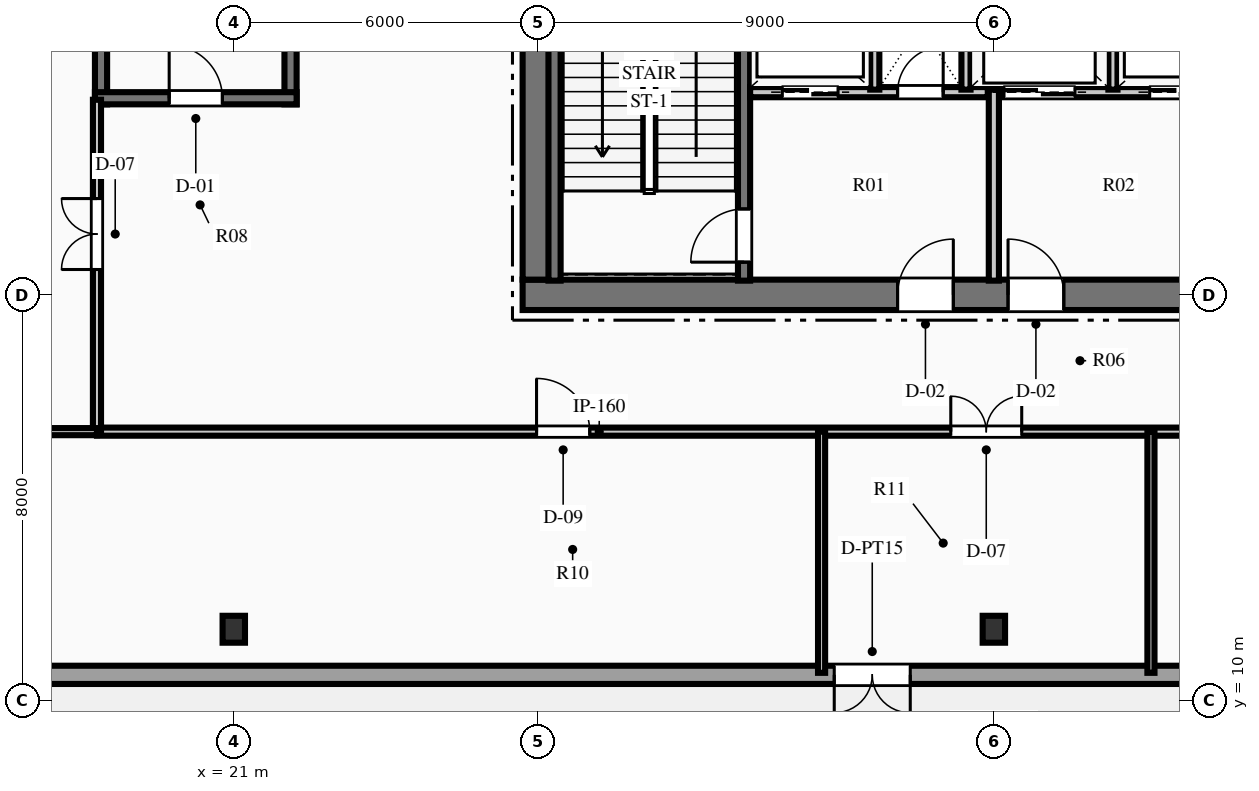
"""IFC4 building model, lengths in metres.
Left out: names, types, materials, properties, quantities, classifications, styles, units other than length and angle.
Written with IfcOpenShell. Run it as: python <this file> out.ifc"""

import sys

from ifc_helpers import new_model, si_unit, direction, frame, frame_2d, origin, origin_2d, place, context, subcontext, project, spatial, rectangle, i_section, extrude, element, fill, save


model = new_model("IFC4")
c1 = context("Model", 3, precision=1e-05, world=origin(), true_north=direction((0.0, 1.0)))
c2 = subcontext(c1, "Body", "Model", "MODEL_VIEW")
j1 = project(units=[si_unit("LENGTHUNIT", "METRE"), si_unit("PLANEANGLEUNIT", "RADIAN")], contexts=[c1])
p1 = place(None, origin())
s1 = spatial("IfcSite", under=j1, at=p1, CompositionType="ELEMENT")
p2 = place(p1, origin())
s2 = spatial("IfcBuilding", under=s1, at=p2, CompositionType="ELEMENT")
p3 = place(p2, frame((0.0, 0.0, 22.2)))
s3 = spatial("IfcBuildingStorey", under=s2, at=p3, CompositionType="ELEMENT", Elevation=22.2)
p4 = place(p3, frame((26.7, 18.0, 0.0), z_axis=(0.0, 0.0, 1.0), x_axis=(1.0, 0.0, 0.0)))
e1 = element("IfcWall", 1, at=p4, inside=s3, PredefinedType="SHEAR", context=c2, shape_type="SweptSolid", body=[
    extrude(rectangle(XDim=18.6, YDim=0.6, at=frame_2d((9.3, 0.0))), origin(), (0.0, 0.0, 1.0), 6.0),
])
p5 = place(p4, frame((7.4, 0.0, 0.0)))
e2 = element("IfcOpeningElement", 2, at=p5, cuts=e1, PredefinedType="OPENING", context=c2, shape_type="SweptSolid", body=[
    extrude(rectangle(XDim=1.1, YDim=2.15, at=frame_2d((0.55, 1.075))), frame((0.0, 0.31, 0.0), z_axis=(0.0, -1.0, 0.0), x_axis=(1.0, 0.0, 0.0)), (0.0, 0.0, 1.0), 0.62),
])
p6 = place(p4, frame((9.58, 0.0, 0.0)))
e3 = element("IfcOpeningElement", 3, at=p6, cuts=e1, PredefinedType="OPENING", context=c2, shape_type="SweptSolid", body=[
    extrude(rectangle(XDim=1.1, YDim=2.15, at=frame_2d((0.55, 1.075))), frame((0.0, 0.31, 0.0), z_axis=(0.0, -1.0, 0.0), x_axis=(1.0, 0.0, 0.0)), (0.0, 0.0, 1.0), 0.62),
])
p7 = place(p3, frame((27.0, 18.3, 0.0), z_axis=(0.0, 0.0, 1.0), x_axis=(0.0, 1.0, 0.0)))
e4 = element("IfcWall", 4, at=p7, inside=s3, PredefinedType="SHEAR", context=c2, shape_type="SweptSolid", body=[
    extrude(rectangle(XDim=15.4, YDim=0.6, at=frame_2d((7.7, 0.0))), origin(), (0.0, 0.0, 1.0), 6.0),
])
p8 = place(p7, frame((9.94, 0.0, 0.0)))
e5 = element("IfcOpeningElement", 5, at=p8, cuts=e4, PredefinedType="OPENING", context=c2, shape_type="SweptSolid", body=[
    extrude(rectangle(XDim=1.4, YDim=2.2, at=frame_2d((0.7, 1.1))), frame((0.0, 0.31, 0.0), z_axis=(0.0, -1.0, 0.0), x_axis=(1.0, 0.0, 0.0)), (0.0, 0.0, 1.0), 0.62),
])
p9 = place(p3, frame((31.07, 18.28, 0.0), z_axis=(0.0, 0.0, 1.0), x_axis=(0.0, 1.0, 0.0)))
e6 = element("IfcWall", 6, at=p9, inside=s3, PredefinedType="SHEAR", context=c2, shape_type="SweptSolid", body=[
    extrude(rectangle(XDim=8.26, YDim=0.24, at=frame_2d((4.13, 0.0))), origin(), (0.0, 0.0, 1.0), 6.0),
])
p10 = place(p9, frame((0.365, 0.0, 0.0)))
e7 = element("IfcOpeningElement", 7, at=p10, cuts=e6, PredefinedType="OPENING", context=c2, shape_type="SweptSolid", body=[
    extrude(rectangle(XDim=1.05, YDim=2.15, at=frame_2d((0.525, 1.075))), frame((0.0, 0.13, 0.0), z_axis=(0.0, -1.0, 0.0), x_axis=(1.0, 0.0, 0.0)), (0.0, 0.0, 1.0), 0.26),
])
p11 = place(p3, frame((27.33, 18.28, 0.0), z_axis=(0.0, 0.0, 1.0), x_axis=(0.0, 1.0, 0.0)))
e8 = element("IfcWall", 8, at=p11, inside=s3, PredefinedType="SHEAR", context=c2, shape_type="SweptSolid", body=[
    extrude(rectangle(XDim=8.26, YDim=0.24, at=frame_2d((4.13, 0.0))), origin(), (0.0, 0.0, 1.0), 6.0),
])
for number, where, z_axis, x_axis in (
    (9, (18.38, 21.76, 0.0), (0.0, 0.0, 1.0), (0.0, 1.0, 0.0)),
    (10, (22.12, 21.76, 0.0), (0.0, 0.0, 1.0), (0.0, 1.0, 0.0)),
):
    element("IfcWall", number, at=place(p3, frame(where, z_axis=z_axis, x_axis=x_axis)), inside=s3, PredefinedType="SHEAR", context=c2, shape_type="SweptSolid", body=[
        extrude(rectangle(XDim=8.38, YDim=0.24, at=frame_2d((4.19, 0.0))), origin(), (0.0, 0.0, 1.0), 6.0),
    ])
p12 = place(p3, frame((18.26, 21.88, 0.0), z_axis=(0.0, 0.0, 1.0), x_axis=(1.0, 0.0, 0.0)))
e11 = element("IfcWall", 11, at=p12, inside=s3, PredefinedType="SHEAR", context=c2, shape_type="SweptSolid", body=[
    extrude(rectangle(XDim=3.98, YDim=0.24, at=frame_2d((1.99, 0.0))), origin(), (0.0, 0.0, 1.0), 6.0),
])
p13 = place(p12, frame((1.465, 0.0, 0.0)))
e12 = element("IfcOpeningElement", 12, at=p13, cuts=e11, PredefinedType="OPENING", context=c2, shape_type="SweptSolid", body=[
    extrude(rectangle(XDim=1.05, YDim=2.15, at=frame_2d((0.525, 1.075))), frame((0.0, 0.13, 0.0), z_axis=(0.0, -1.0, 0.0), x_axis=(1.0, 0.0, 0.0)), (0.0, 0.0, 1.0), 0.26),
])
for number, where, z_axis, x_axis in (
    (13, (21.0, 11.4, 0.0), (0.0, 0.0, 1.0), (1.0, 0.0, 0.0)),
    (14, (36.0, 11.4, 0.0), (0.0, 0.0, 1.0), (1.0, 0.0, 0.0)),
):
    element("IfcColumn", number, at=place(p3, frame(where, z_axis=z_axis, x_axis=x_axis)), inside=s3, PredefinedType="COLUMN", context=c2, shape_type="SweptSolid", body=[
        extrude(i_section(OverallWidth=0.442, OverallDepth=0.531, WebThickness=0.066, FlangeThickness=0.106, at=origin_2d()), origin(), (0.0, 0.0, 1.0), 6.0),
    ])
p14 = place(p3, frame((59.8, 10.5, 0.0), z_axis=(0.0, 0.0, 1.0), x_axis=(-1.0, 0.0, 0.0)))
e15 = element("IfcWall", 15, at=p14, inside=s3, PredefinedType="STANDARD", context=c2, shape_type="SweptSolid", body=[
    extrude(rectangle(XDim=47.6, YDim=0.36, at=frame_2d((23.8, 0.0))), origin(), (0.0, 0.0, 1.0), 5.59),
])
p15 = place(p14, frame((25.45, 0.0, 0.0)))
e16 = element("IfcOpeningElement", 16, at=p15, cuts=e15, PredefinedType="OPENING", context=c2, shape_type="SweptSolid", body=[
    extrude(rectangle(XDim=1.5, YDim=2.25, at=frame_2d((0.75, 1.125))), frame((0.0, 0.19, 0.0), z_axis=(0.0, -1.0, 0.0), x_axis=(1.0, 0.0, 0.0)), (0.0, 0.0, 1.0), 0.38),
])
p16 = place(p3, frame((36.0, 18.28, 0.0), z_axis=(0.0, 0.0, 1.0), x_axis=(0.0, 1.0, 0.0)))
e17 = element("IfcWall", 17, at=p16, inside=s3, PredefinedType="PARTITIONING", context=c2, shape_type="SweptSolid", body=[
    extrude(rectangle(XDim=3.77, YDim=0.2, at=frame_2d((1.885, 0.0))), origin(), (0.0, 0.0, 1.0), 5.59),
])
p17 = place(p3, frame((31.19, 22.0, 0.0), z_axis=(0.0, 0.0, 1.0), x_axis=(1.0, 0.0, 0.0)))
e18 = element("IfcWall", 18, at=p17, inside=s3, PredefinedType="PARTITIONING", context=c2, shape_type="SweptSolid", body=[
    extrude(rectangle(XDim=4.69, YDim=0.2, at=frame_2d((2.345, 0.0))), origin(), (0.0, 0.0, 1.0), 5.59),
])
p18 = place(p17, frame((2.91, 0.0, 0.0)))
e19 = element("IfcOpeningElement", 19, at=p18, cuts=e18, PredefinedType="OPENING", context=c2, shape_type="SweptSolid", body=[
    extrude(rectangle(XDim=0.9, YDim=2.15, at=frame_2d((0.45, 1.075))), frame((0.0, 0.11, 0.0), z_axis=(0.0, -1.0, 0.0), x_axis=(1.0, 0.0, 0.0)), (0.0, 0.0, 1.0), 0.22),
])
p19 = place(p17, frame((0.635, 0.0, 0.0)))
e20 = element("IfcOpeningElement", 20, at=p19, cuts=e18, PredefinedType="OPENING", context=c2, shape_type="SweptSolid", body=[
    extrude(rectangle(XDim=1.1, YDim=2.15, at=frame_2d((0.55, 1.075))), frame((0.0, 0.11, 0.0), z_axis=(0.0, -1.0, 0.0), x_axis=(1.0, 0.0, 0.0)), (0.0, 0.0, 1.0), 0.22),
])
p20 = place(p3, frame((36.12, 22.0, 0.0), z_axis=(0.0, 0.0, 1.0), x_axis=(1.0, 0.0, 0.0)))
e21 = element("IfcWall", 21, at=p20, inside=s3, PredefinedType="PARTITIONING", context=c2, shape_type="SweptSolid", body=[
    extrude(rectangle(XDim=4.69, YDim=0.2, at=frame_2d((2.345, 0.0))), origin(), (0.0, 0.0, 1.0), 5.59),
])
p21 = place(p20, frame((2.955, 0.0, 0.0)))
e22 = element("IfcOpeningElement", 22, at=p21, cuts=e21, PredefinedType="OPENING", context=c2, shape_type="SweptSolid", body=[
    extrude(rectangle(XDim=1.1, YDim=2.15, at=frame_2d((0.55, 1.075))), frame((0.0, 0.11, 0.0), z_axis=(0.0, -1.0, 0.0), x_axis=(1.0, 0.0, 0.0)), (0.0, 0.0, 1.0), 0.22),
])
p22 = place(p20, frame((0.08, 0.0, 0.0)))
e23 = element("IfcOpeningElement", 23, at=p22, cuts=e21, PredefinedType="OPENING", context=c2, shape_type="SweptSolid", body=[
    extrude(rectangle(XDim=1.4, YDim=2.2, at=frame_2d((0.7, 1.1))), frame((0.0, 0.11, 0.0), z_axis=(0.0, -1.0, 0.0), x_axis=(1.0, 0.0, 0.0)), (0.0, 0.0, 1.0), 0.22),
])
for number, where, z_axis, x_axis in (
    (24, (33.65, 22.05, 0.0), (0.0, 0.0, 1.0), (0.0, 1.0, 0.0)),
    (25, (35.45, 22.05, 0.0), (0.0, 0.0, 1.0), (0.0, 1.0, 0.0)),
    (26, (38.35, 22.05, 0.0), (0.0, 0.0, 1.0), (0.0, 1.0, 0.0)),
):
    element("IfcWall", number, at=place(p3, frame(where, z_axis=z_axis, x_axis=x_axis)), inside=s3, PredefinedType="PARTITIONING", context=c2, shape_type="SweptSolid", body=[
        extrude(rectangle(XDim=2.6, YDim=0.18, at=frame_2d((1.3, 0.0))), origin(), (0.0, 0.0, 1.0), 5.59),
    ])
p23 = place(p3, frame((18.3, 15.3, 0.0), z_axis=(0.0, 0.0, 1.0), x_axis=(1.0, 0.0, 0.0)))
e27 = element("IfcWall", 27, at=p23, inside=s3, PredefinedType="PARTITIONING", context=c2, shape_type="SweptSolid", body=[
    extrude(rectangle(XDim=35.4, YDim=0.16, at=frame_2d((17.7, 0.0))), origin(), (0.0, 0.0, 1.0), 5.59),
])
p24 = place(p23, frame((8.675, 0.0, 0.0)))
e28 = element("IfcOpeningElement", 28, at=p24, cuts=e27, PredefinedType="OPENING", context=c2, shape_type="SweptSolid", body=[
    extrude(rectangle(XDim=1.05, YDim=2.15, at=frame_2d((0.525, 1.075))), frame((0.0, 0.09, 0.0), z_axis=(0.0, -1.0, 0.0), x_axis=(1.0, 0.0, 0.0)), (0.0, 0.0, 1.0), 0.18),
])
p25 = place(p23, frame((16.85, 0.0, 0.0)))
e29 = element("IfcOpeningElement", 29, at=p25, cuts=e27, PredefinedType="OPENING", context=c2, shape_type="SweptSolid", body=[
    extrude(rectangle(XDim=1.4, YDim=2.2, at=frame_2d((0.7, 1.1))), frame((0.0, 0.09, 0.0), z_axis=(0.0, -1.0, 0.0), x_axis=(1.0, 0.0, 0.0)), (0.0, 0.0, 1.0), 0.18),
])
p26 = place(p23, frame((26.975, 0.0, 0.0)))
e30 = element("IfcOpeningElement", 30, at=p26, cuts=e27, PredefinedType="OPENING", context=c2, shape_type="SweptSolid", body=[
    extrude(rectangle(XDim=1.05, YDim=2.15, at=frame_2d((0.525, 1.075))), frame((0.0, 0.09, 0.0), z_axis=(0.0, -1.0, 0.0), x_axis=(1.0, 0.0, 0.0)), (0.0, 0.0, 1.0), 0.18),
])
p27 = place(p3, frame((18.3, 15.3, 0.0), z_axis=(0.0, 0.0, 1.0), x_axis=(0.0, 1.0, 0.0)))
e31 = element("IfcWall", 31, at=p27, inside=s3, PredefinedType="PARTITIONING", context=c2, shape_type="SweptSolid", body=[
    extrude(rectangle(XDim=6.55, YDim=0.16, at=frame_2d((3.275, 0.0))), origin(), (0.0, 0.0, 1.0), 5.59),
])
p28 = place(p27, frame((3.2, 0.0, 0.0)))
e32 = element("IfcOpeningElement", 32, at=p28, cuts=e31, PredefinedType="OPENING", context=c2, shape_type="SweptSolid", body=[
    extrude(rectangle(XDim=1.4, YDim=2.2, at=frame_2d((0.7, 1.1))), frame((0.0, 0.09, 0.0), z_axis=(0.0, -1.0, 0.0), x_axis=(1.0, 0.0, 0.0)), (0.0, 0.0, 1.0), 0.18),
])
p29 = place(p3, frame((9.04, 15.3, 0.0), z_axis=(0.0, 0.0, 1.0), x_axis=(1.0, 0.0, 0.0)))
e33 = element("IfcWall", 33, at=p29, inside=s3, PredefinedType="PARTITIONING", context=c2, shape_type="SweptSolid", body=[
    extrude(rectangle(XDim=9.26, YDim=0.14, at=frame_2d((4.63, 0.0))), origin(), (0.0, 0.0, 1.0), 5.59),
])
p30 = place(p3, frame((32.6, 10.54, 0.0), z_axis=(0.0, 0.0, 1.0), x_axis=(0.0, 1.0, 0.0)))
e34 = element("IfcWall", 34, at=p30, inside=s3, PredefinedType="PARTITIONING", context=c2, shape_type="SweptSolid", body=[
    extrude(rectangle(XDim=4.76, YDim=0.14, at=frame_2d((2.38, 0.0))), origin(), (0.0, 0.0, 1.0), 5.59),
])
p31 = place(p3, frame((39.1, 10.54, 0.0), z_axis=(0.0, 0.0, 1.0), x_axis=(0.0, 1.0, 0.0)))
e35 = element("IfcWall", 35, at=p31, inside=s3, PredefinedType="PARTITIONING", context=c2, shape_type="SweptSolid", body=[
    extrude(rectangle(XDim=4.76, YDim=0.14, at=frame_2d((2.38, 0.0))), origin(), (0.0, 0.0, 1.0), 4.385),
])
p32 = place(p15, origin())
e36 = element("IfcDoor", 36, at=p32, inside=s3, OperationType="DOUBLE_DOOR_SINGLE_SWING", PredefinedType="DOOR", context=c2, shape_type="SweptSolid", body=[
    extrude(rectangle(XDim=1.5, YDim=2.25, at=frame_2d((0.75, 1.125))), frame((0.0, 0.025, 0.0), z_axis=(0.0, -1.0, 0.0), x_axis=(1.0, 0.0, 0.0)), (0.0, 0.0, 1.0), 0.05),
])
fill(e16, e36)
p33 = place(p10, origin())
e37 = element("IfcDoor", 37, at=p33, inside=s3, OperationType="SINGLE_SWING_LEFT", PredefinedType="DOOR", context=c2, shape_type="SweptSolid", body=[
    extrude(rectangle(XDim=1.05, YDim=2.15, at=frame_2d((0.525, 1.075))), frame((0.0, 0.025, 0.0), z_axis=(0.0, -1.0, 0.0), x_axis=(1.0, 0.0, 0.0)), (0.0, 0.0, 1.0), 0.05),
])
fill(e7, e37)
p34 = place(p5, origin())
e38 = element("IfcDoor", 38, at=p34, inside=s3, OperationType="SINGLE_SWING_RIGHT", PredefinedType="DOOR", context=c2, shape_type="SweptSolid", body=[
    extrude(rectangle(XDim=1.1, YDim=2.15, at=frame_2d((0.55, 1.075))), frame((0.0, 0.025, 0.0), z_axis=(0.0, -1.0, 0.0), x_axis=(1.0, 0.0, 0.0)), (0.0, 0.0, 1.0), 0.05),
])
fill(e2, e38)
p35 = place(p6, origin())
e39 = element("IfcDoor", 39, at=p35, inside=s3, OperationType="SINGLE_SWING_LEFT", PredefinedType="DOOR", context=c2, shape_type="SweptSolid", body=[
    extrude(rectangle(XDim=1.1, YDim=2.15, at=frame_2d((0.55, 1.075))), frame((0.0, 0.025, 0.0), z_axis=(0.0, -1.0, 0.0), x_axis=(1.0, 0.0, 0.0)), (0.0, 0.0, 1.0), 0.05),
])
fill(e3, e39)
p36 = place(p18, origin())
e40 = element("IfcDoor", 40, at=p36, inside=s3, OperationType="SINGLE_SWING_RIGHT", PredefinedType="DOOR", context=c2, shape_type="SweptSolid", body=[
    extrude(rectangle(XDim=0.9, YDim=2.15, at=frame_2d((0.45, 1.075))), frame((0.0, 0.025, 0.0), z_axis=(0.0, -1.0, 0.0), x_axis=(1.0, 0.0, 0.0)), (0.0, 0.0, 1.0), 0.05),
])
fill(e19, e40)
p37 = place(p13, origin())
e41 = element("IfcDoor", 41, at=p37, inside=s3, OperationType="SINGLE_SWING_LEFT", PredefinedType="DOOR", context=c2, shape_type="SweptSolid", body=[
    extrude(rectangle(XDim=1.05, YDim=2.15, at=frame_2d((0.525, 1.075))), frame((0.0, 0.025, 0.0), z_axis=(0.0, -1.0, 0.0), x_axis=(1.0, 0.0, 0.0)), (0.0, 0.0, 1.0), 0.05),
])
fill(e12, e41)
p38 = place(p24, origin())
e42 = element("IfcDoor", 42, at=p38, inside=s3, OperationType="SINGLE_SWING_LEFT", PredefinedType="DOOR", context=c2, shape_type="SweptSolid", body=[
    extrude(rectangle(XDim=1.05, YDim=2.15, at=frame_2d((0.525, 1.075))), frame((0.0, 0.025, 0.0), z_axis=(0.0, -1.0, 0.0), x_axis=(1.0, 0.0, 0.0)), (0.0, 0.0, 1.0), 0.05),
])
fill(e28, e42)
p39 = place(p25, origin())
e43 = element("IfcDoor", 43, at=p39, inside=s3, OperationType="DOUBLE_DOOR_SINGLE_SWING", PredefinedType="DOOR", context=c2, shape_type="SweptSolid", body=[
    extrude(rectangle(XDim=1.4, YDim=2.2, at=frame_2d((0.7, 1.1))), frame((0.0, 0.025, 0.0), z_axis=(0.0, -1.0, 0.0), x_axis=(1.0, 0.0, 0.0)), (0.0, 0.0, 1.0), 0.05),
])
fill(e29, e43)
p40 = place(p28, origin())
e44 = element("IfcDoor", 44, at=p40, inside=s3, OperationType="DOUBLE_DOOR_SINGLE_SWING", PredefinedType="DOOR", context=c2, shape_type="SweptSolid", body=[
    extrude(rectangle(XDim=1.4, YDim=2.2, at=frame_2d((0.7, 1.1))), frame((0.0, 0.025, 0.0), z_axis=(0.0, -1.0, 0.0), x_axis=(1.0, 0.0, 0.0)), (0.0, 0.0, 1.0), 0.05),
])
fill(e32, e44)
p41 = place(p19, origin())
e45 = element("IfcDoor", 45, at=p41, inside=s3, OperationType="SLIDING_TO_LEFT", PredefinedType="DOOR", context=c2, shape_type="SweptSolid", body=[
    extrude(rectangle(XDim=1.1, YDim=2.15, at=frame_2d((0.55, 1.075))), frame((0.0, 0.025, 0.0), z_axis=(0.0, -1.0, 0.0), x_axis=(1.0, 0.0, 0.0)), (0.0, 0.0, 1.0), 0.05),
])
fill(e20, e45)
p42 = place(p21, origin())
e46 = element("IfcDoor", 46, at=p42, inside=s3, OperationType="SLIDING_TO_LEFT", PredefinedType="DOOR", context=c2, shape_type="SweptSolid", body=[
    extrude(rectangle(XDim=1.1, YDim=2.15, at=frame_2d((0.55, 1.075))), frame((0.0, 0.025, 0.0), z_axis=(0.0, -1.0, 0.0), x_axis=(1.0, 0.0, 0.0)), (0.0, 0.0, 1.0), 0.05),
])
fill(e22, e46)
p43 = place(p22, origin())
e47 = element("IfcDoor", 47, at=p43, inside=s3, OperationType="SLIDING_TO_LEFT", PredefinedType="DOOR", context=c2, shape_type="SweptSolid", body=[
    extrude(rectangle(XDim=1.4, YDim=2.2, at=frame_2d((0.7, 1.1))), frame((0.0, 0.025, 0.0), z_axis=(0.0, -1.0, 0.0), x_axis=(1.0, 0.0, 0.0)), (0.0, 0.0, 1.0), 0.05),
])
fill(e23, e47)
save(model, sys.argv[1])
